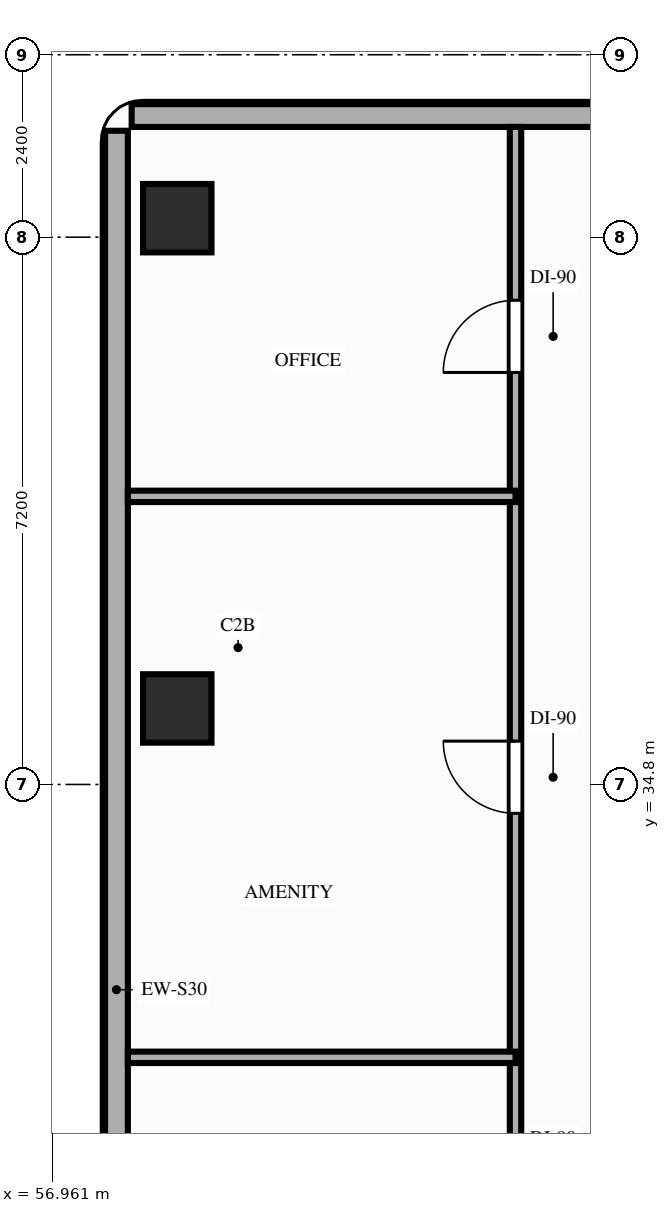
"""IFC4 building model, lengths in metres.
Left out: names, types, materials, properties, quantities, classifications, styles, units other than length and angle.
Written with IfcOpenShell. Run it as: python <this file> out.ifc"""

import sys

from ifc_helpers import new_model, si_unit, direction, frame, frame_2d, origin, origin_2d, place, context, subcontext, project, spatial, rectangle, extrude, element, fill, save


model = new_model("IFC4")
c1 = context("Model", 3, precision=1e-05, world=origin(), true_north=direction((0.0, 1.0)))
c2 = subcontext(c1, "Body", "Model", "MODEL_VIEW")
j1 = project(units=[si_unit("LENGTHUNIT", "METRE"), si_unit("PLANEANGLEUNIT", "RADIAN")], contexts=[c1])
p1 = place(None, origin())
s1 = spatial("IfcSite", under=j1, at=p1, CompositionType="ELEMENT")
p2 = place(p1, origin())
s2 = spatial("IfcBuilding", under=s1, at=p2, CompositionType="ELEMENT")
p3 = place(p2, frame((0.0, 0.0, 72.4)))
s3 = spatial("IfcBuildingStorey", under=s2, at=p3, CompositionType="ELEMENT", Elevation=72.4)
for number, where, z_axis, x_axis in (
    (1, (58.6, 35.8, 0.0), (0.0, 0.0, 1.0), (1.0, 0.0, 0.0)),
    (2, (58.6, 42.25, 0.0), (0.0, 0.0, 1.0), (1.0, 0.0, 0.0)),
):
    element("IfcColumn", number, at=place(p3, frame(where, z_axis=z_axis, x_axis=x_axis)), inside=s3, PredefinedType="COLUMN", context=c2, shape_type="SweptSolid", body=[
        extrude(rectangle(XDim=0.9, YDim=0.9, at=origin_2d()), origin(), (0.0, 0.0, 1.0), 3.2),
    ])
p4 = place(p3, frame((57.8, 43.4, 0.0), z_axis=(0.0, 0.0, 1.0), x_axis=(0.0, -1.0, 0.0)))
e3 = element("IfcWall", 3, at=p4, inside=s3, PredefinedType="STANDARD", context=c2, shape_type="SweptSolid", body=[
    extrude(rectangle(XDim=22.6, YDim=0.3, at=frame_2d((11.3, 0.0))), origin(), (0.0, 0.0, 1.0), 2.54),
])
p5 = place(p3, frame((72.8, 43.6, 0.0), z_axis=(0.0, 0.0, 1.0), x_axis=(-1.0, 0.0, 0.0)))
e4 = element("IfcWall", 4, at=p5, inside=s3, PredefinedType="STANDARD", context=c2, shape_type="SweptSolid", body=[
    extrude(rectangle(XDim=14.8, YDim=0.3, at=frame_2d((7.4, 0.0))), origin(), (0.0, 0.0, 1.0), 2.96),
])
p6 = place(p3, frame((63.05, 20.75, 0.0), z_axis=(0.0, 0.0, 1.0), x_axis=(0.0, 1.0, 0.0)))
e5 = element("IfcWall", 5, at=p6, inside=s3, PredefinedType="PARTITIONING", context=c2, shape_type="SweptSolid", body=[
    extrude(rectangle(XDim=22.7, YDim=0.15, at=frame_2d((11.35, 0.0))), origin(), (0.0, 0.0, 1.0), 2.54),
])
p7 = place(p6, frame((0.73, 0.0, 0.0)))
e6 = element("IfcOpeningElement", 6, at=p7, cuts=e5, PredefinedType="OPENING", context=c2, shape_type="SweptSolid", body=[
    extrude(rectangle(XDim=0.85, YDim=2.1, at=frame_2d((0.425, 1.05))), frame((0.0, 0.085, 0.0), z_axis=(0.0, -1.0, 0.0), x_axis=(1.0, 0.0, 0.0)), (0.0, 0.0, 1.0), 0.17),
])
p8 = place(p6, frame((3.43, 0.0, 0.0)))
e7 = element("IfcOpeningElement", 7, at=p8, cuts=e5, PredefinedType="OPENING", context=c2, shape_type="SweptSolid", body=[
    extrude(rectangle(XDim=0.95, YDim=2.1, at=frame_2d((0.475, 1.05))), frame((0.0, 0.085, 0.0), z_axis=(0.0, -1.0, 0.0), x_axis=(1.0, 0.0, 0.0)), (0.0, 0.0, 1.0), 0.17),
])
p9 = place(p6, frame((8.15, 0.0, 0.0)))
e8 = element("IfcOpeningElement", 8, at=p9, cuts=e5, PredefinedType="OPENING", context=c2, shape_type="SweptSolid", body=[
    extrude(rectangle(XDim=0.95, YDim=2.15, at=frame_2d((0.475, 1.075))), frame((0.0, 0.085, 0.0), z_axis=(0.0, -1.0, 0.0), x_axis=(1.0, 0.0, 0.0)), (0.0, 0.0, 1.0), 0.17),
])
p10 = place(p6, frame((13.67, 0.0, 0.0)))
e9 = element("IfcOpeningElement", 9, at=p10, cuts=e5, PredefinedType="OPENING", context=c2, shape_type="SweptSolid", body=[
    extrude(rectangle(XDim=0.95, YDim=2.15, at=frame_2d((0.475, 1.075))), frame((0.0, 0.085, 0.0), z_axis=(0.0, -1.0, 0.0), x_axis=(1.0, 0.0, 0.0)), (0.0, 0.0, 1.0), 0.17),
])
p11 = place(p6, frame((19.47, 0.0, 0.0)))
e10 = element("IfcOpeningElement", 10, at=p11, cuts=e5, PredefinedType="OPENING", context=c2, shape_type="SweptSolid", body=[
    extrude(rectangle(XDim=0.95, YDim=2.15, at=frame_2d((0.475, 1.075))), frame((0.0, 0.085, 0.0), z_axis=(0.0, -1.0, 0.0), x_axis=(1.0, 0.0, 0.0)), (0.0, 0.0, 1.0), 0.17),
])
for number, where, z_axis, x_axis in (
    (11, (57.95, 31.21, 0.0), (0.0, 0.0, 1.0), (1.0, 0.0, 0.0)),
    (12, (57.95, 38.59, 0.0), (0.0, 0.0, 1.0), (1.0, 0.0, 0.0)),
):
    element("IfcWall", number, at=place(p3, frame(where, z_axis=z_axis, x_axis=x_axis)), inside=s3, PredefinedType="PARTITIONING", context=c2, shape_type="SweptSolid", body=[
        extrude(rectangle(XDim=5.1, YDim=0.15, at=frame_2d((2.55, 0.0))), origin(), (0.0, 0.0, 1.0), 2.54),
    ])
p12 = place(p10, origin())
e13 = element("IfcDoor", 13, at=p12, inside=s3, OperationType="SINGLE_SWING_RIGHT", PredefinedType="DOOR", context=c2, shape_type="SweptSolid", body=[
    extrude(rectangle(XDim=0.95, YDim=2.15, at=frame_2d((0.475, 1.075))), frame((0.0, 0.025, 0.0), z_axis=(0.0, -1.0, 0.0), x_axis=(1.0, 0.0, 0.0)), (0.0, 0.0, 1.0), 0.05),
])
fill(e9, e13)
p13 = place(p11, origin())
e14 = element("IfcDoor", 14, at=p13, inside=s3, OperationType="SINGLE_SWING_LEFT", PredefinedType="DOOR", context=c2, shape_type="SweptSolid", body=[
    extrude(rectangle(XDim=0.95, YDim=2.15, at=frame_2d((0.475, 1.075))), frame((0.0, 0.025, 0.0), z_axis=(0.0, -1.0, 0.0), x_axis=(1.0, 0.0, 0.0)), (0.0, 0.0, 1.0), 0.05),
])
fill(e10, e14)
save(model, sys.argv[1])
